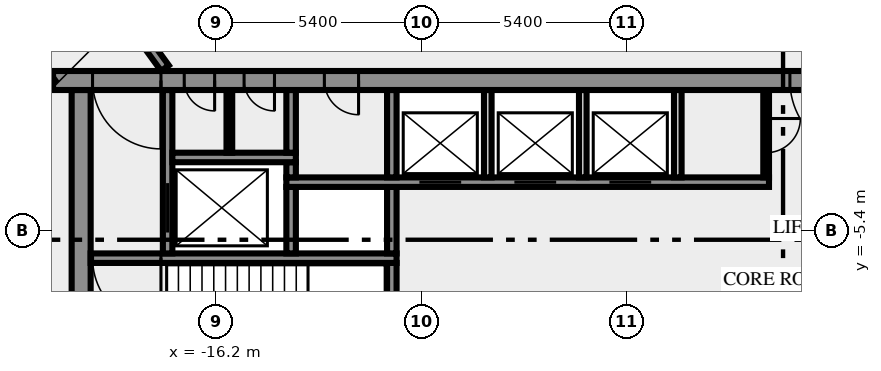
"""IFC4 building model, lengths in metres.
Left out: names, types, materials, properties, quantities, classifications, styles, units other than length and angle.
Written with IfcOpenShell. Run it as: python <this file> out.ifc"""

import sys

from ifc_helpers import new_model, si_unit, direction, frame, frame_2d, origin, place, context, subcontext, project, spatial, rectangle, extrude, element, fill, save


model = new_model("IFC4")
c1 = context("Model", 3, precision=1e-05, world=origin(), true_north=direction((0.0, 1.0)))
c2 = subcontext(c1, "Body", "Model", "MODEL_VIEW")
j1 = project(units=[si_unit("LENGTHUNIT", "METRE"), si_unit("PLANEANGLEUNIT", "RADIAN")], contexts=[c1])
p1 = place(None, origin())
s1 = spatial("IfcSite", under=j1, at=p1, CompositionType="ELEMENT")
p2 = place(p1, origin())
s2 = spatial("IfcBuilding", under=s1, at=p2, CompositionType="ELEMENT")
p3 = place(p2, frame((0.0, 0.0, 101.0)))
s3 = spatial("IfcBuildingStorey", under=s2, at=p3, CompositionType="ELEMENT", Elevation=101.0)
p4 = place(p3, frame((-19.75, -10.5, 0.0), z_axis=(0.0, 0.0, 1.0), x_axis=(0.0, 1.0, 0.0)))
e1 = element("IfcWall", 1, at=p4, inside=s3, PredefinedType="SHEAR", context=c2, shape_type="SweptSolid", body=[
    extrude(rectangle(XDim=8.8, YDim=0.5, at=frame_2d((4.4, 0.0))), origin(), (0.0, 0.0, 1.0), 3.65),
])
p5 = place(p3, frame((-11.575, -7.25, 0.0), z_axis=(0.0, 0.0, 1.0), x_axis=(0.0, 1.0, 0.0)))
e2 = element("IfcWall", 2, at=p5, inside=s3, PredefinedType="SHEAR", context=c2, shape_type="SweptSolid", body=[
    extrude(rectangle(XDim=1.0, YDim=0.25, at=frame_2d((0.5, 0.0))), origin(), (0.0, 0.0, 1.0), 3.65),
])
p6 = place(p3, frame((-11.45, -6.125, 0.0), z_axis=(0.0, 0.0, 1.0), x_axis=(-1.0, 0.0, 0.0)))
e3 = element("IfcWall", 3, at=p6, inside=s3, PredefinedType="SHEAR", context=c2, shape_type="SweptSolid", body=[
    extrude(rectangle(XDim=8.05, YDim=0.25, at=frame_2d((4.025, 0.0))), origin(), (0.0, 0.0, 1.0), 3.65),
])
p7 = place(p6, frame((6.2, 0.0, 0.0)))
e4 = element("IfcOpeningElement", 4, at=p7, cuts=e3, PredefinedType="OPENING", context=c2, shape_type="SweptSolid", body=[
    extrude(rectangle(XDim=1.8, YDim=2.1, at=frame_2d((0.9, 1.05))), frame((0.0, 0.135, 0.0), z_axis=(0.0, -1.0, 0.0), x_axis=(1.0, 0.0, 0.0)), (0.0, 0.0, 1.0), 0.27),
])
p8 = place(p3, frame((-17.475, -6.0, 0.0), z_axis=(0.0, 0.0, 1.0), x_axis=(0.0, 1.0, 0.0)))
e5 = element("IfcWall", 5, at=p8, inside=s3, PredefinedType="SHEAR", context=c2, shape_type="SweptSolid", body=[
    extrude(rectangle(XDim=4.3, YDim=0.25, at=frame_2d((2.15, 0.0))), origin(), (0.0, 0.0, 1.0), 3.65),
])
p9 = place(p8, frame((0.55, 0.0, 0.0)))
e6 = element("IfcOpeningElement", 6, at=p9, cuts=e5, PredefinedType="OPENING", context=c2, shape_type="SweptSolid", body=[
    extrude(rectangle(XDim=1.3, YDim=2.1, at=frame_2d((0.65, 1.05))), frame((0.0, 0.135, 0.0), z_axis=(0.0, -1.0, 0.0), x_axis=(1.0, 0.0, 0.0)), (0.0, 0.0, 1.0), 0.27),
])
for number, where, z_axis, x_axis in (
    (7, (-14.225, -6.0, 0.0), (0.0, 0.0, 1.0), (0.0, 1.0, 0.0)),
    (8, (-11.575, -6.0, 0.0), (0.0, 0.0, 1.0), (0.0, 1.0, 0.0)),
):
    element("IfcWall", number, at=place(p3, frame(where, z_axis=z_axis, x_axis=x_axis)), inside=s3, PredefinedType="SHEAR", context=c2, shape_type="SweptSolid", body=[
        extrude(rectangle(XDim=1.75, YDim=0.25, at=frame_2d((0.875, 0.0))), origin(), (0.0, 0.0, 1.0), 3.65),
    ])
p10 = place(p3, frame((-14.35, -4.125, 0.0), z_axis=(0.0, 0.0, 1.0), x_axis=(1.0, 0.0, 0.0)))
e9 = element("IfcWall", 9, at=p10, inside=s3, PredefinedType="SHEAR", context=c2, shape_type="SweptSolid", body=[
    extrude(rectangle(XDim=12.7, YDim=0.25, at=frame_2d((6.35, 0.0))), origin(), (0.0, 0.0, 1.0), 3.65),
])
p11 = place(p10, frame((3.5, 0.0, 0.0)))
e10 = element("IfcOpeningElement", 10, at=p11, cuts=e9, PredefinedType="OPENING", context=c2, shape_type="SweptSolid", body=[
    extrude(rectangle(XDim=1.1, YDim=2.1, at=frame_2d((0.55, 1.05))), frame((0.0, 0.135, 0.0), z_axis=(0.0, -1.0, 0.0), x_axis=(1.0, 0.0, 0.0)), (0.0, 0.0, 1.0), 0.27),
])
p12 = place(p10, frame((6.0, 0.0, 0.0)))
e11 = element("IfcOpeningElement", 11, at=p12, cuts=e9, PredefinedType="OPENING", context=c2, shape_type="SweptSolid", body=[
    extrude(rectangle(XDim=1.1, YDim=2.1, at=frame_2d((0.55, 1.05))), frame((0.0, 0.135, 0.0), z_axis=(0.0, -1.0, 0.0), x_axis=(1.0, 0.0, 0.0)), (0.0, 0.0, 1.0), 0.27),
])
p13 = place(p10, frame((8.5, 0.0, 0.0)))
e12 = element("IfcOpeningElement", 12, at=p13, cuts=e9, PredefinedType="OPENING", context=c2, shape_type="SweptSolid", body=[
    extrude(rectangle(XDim=1.1, YDim=2.1, at=frame_2d((0.55, 1.05))), frame((0.0, 0.135, 0.0), z_axis=(0.0, -1.0, 0.0), x_axis=(1.0, 0.0, 0.0)), (0.0, 0.0, 1.0), 0.27),
])
p14 = place(p3, frame((-14.225, -4.0, 0.0), z_axis=(0.0, 0.0, 1.0), x_axis=(0.0, 1.0, 0.0)))
e13 = element("IfcWall", 13, at=p14, inside=s3, PredefinedType="SHEAR", context=c2, shape_type="SweptSolid", body=[
    extrude(rectangle(XDim=0.4, YDim=0.25, at=frame_2d((0.2, 0.0))), origin(), (0.0, 0.0, 1.0), 3.65),
])
p15 = place(p3, frame((-11.575, -4.0, 0.0), z_axis=(0.0, 0.0, 1.0), x_axis=(0.0, 1.0, 0.0)))
e14 = element("IfcWall", 14, at=p15, inside=s3, PredefinedType="SHEAR", context=c2, shape_type="SweptSolid", body=[
    extrude(rectangle(XDim=2.3, YDim=0.25, at=frame_2d((1.15, 0.0))), origin(), (0.0, 0.0, 1.0), 3.65),
])
for number, where, z_axis, x_axis in (
    (15, (-9.05, -4.0, 0.0), (0.0, 0.0, 1.0), (0.0, 1.0, 0.0)),
    (16, (-6.55, -4.0, 0.0), (0.0, 0.0, 1.0), (0.0, 1.0, 0.0)),
    (17, (-4.05, -4.0, 0.0), (0.0, 0.0, 1.0), (0.0, 1.0, 0.0)),
):
    element("IfcWall", number, at=place(p3, frame(where, z_axis=z_axis, x_axis=x_axis)), inside=s3, PredefinedType="SOLIDWALL", context=c2, shape_type="SweptSolid", body=[
        extrude(rectangle(XDim=2.3, YDim=0.2, at=frame_2d((1.15, 0.0))), origin(), (0.0, 0.0, 1.0), 3.65),
    ])
p16 = place(p3, frame((-1.725, -1.7, 0.0), z_axis=(0.0, 0.0, 1.0), x_axis=(0.0, -1.0, 0.0)))
e18 = element("IfcWall", 18, at=p16, inside=s3, PredefinedType="PARTITIONING", context=c2, shape_type="SweptSolid", body=[
    extrude(rectangle(XDim=2.3, YDim=0.15, at=frame_2d((1.15, 0.0))), origin(), (0.0, 0.0, 1.0), 3.65),
])
p17 = place(p16, frame((0.75, 0.0, 0.0)))
e19 = element("IfcOpeningElement", 19, at=p17, cuts=e18, PredefinedType="OPENING", context=c2, shape_type="SweptSolid", body=[
    extrude(rectangle(XDim=0.9, YDim=2.1, at=frame_2d((0.45, 1.05))), frame((0.0, 0.085, 0.0), z_axis=(0.0, -1.0, 0.0), x_axis=(1.0, 0.0, 0.0)), (0.0, 0.0, 1.0), 0.17),
])
p18 = place(p3, frame((-17.35, -3.475, 0.0), z_axis=(0.0, 0.0, 1.0), x_axis=(1.0, 0.0, 0.0)))
e20 = element("IfcWall", 20, at=p18, inside=s3, PredefinedType="SHEAR", context=c2, shape_type="SweptSolid", body=[
    extrude(rectangle(XDim=3.25, YDim=0.25, at=frame_2d((1.625, 0.0))), origin(), (0.0, 0.0, 1.0), 3.65),
])
p19 = place(p3, frame((-15.85, -3.35, 0.0), z_axis=(0.0, 0.0, 1.0), x_axis=(0.0, 1.0, 0.0)))
e21 = element("IfcWall", 21, at=p19, inside=s3, PredefinedType="PARTITIONING", context=c2, shape_type="SweptSolid", body=[
    extrude(rectangle(XDim=1.65, YDim=0.15, at=frame_2d((0.825, 0.0))), origin(), (0.0, 0.0, 1.0), 3.65),
])
p20 = place(p3, frame((-14.225, -3.35, 0.0), z_axis=(0.0, 0.0, 1.0), x_axis=(0.0, 1.0, 0.0)))
e22 = element("IfcWall", 22, at=p20, inside=s3, PredefinedType="SHEAR", context=c2, shape_type="SweptSolid", body=[
    extrude(rectangle(XDim=1.65, YDim=0.25, at=frame_2d((0.825, 0.0))), origin(), (0.0, 0.0, 1.0), 3.65),
])
p21 = place(p3, frame((20.49, -1.45, 0.0), z_axis=(0.0, 0.0, 1.0), x_axis=(-1.0, 0.0, 0.0)))
e23 = element("IfcWall", 23, at=p21, inside=s3, PredefinedType="SHEAR", context=c2, shape_type="SweptSolid", body=[
    extrude(rectangle(XDim=40.98, YDim=0.5, at=frame_2d((20.49, 0.0))), origin(), (0.0, 0.0, 1.0), 3.65),
])
p22 = place(p21, frame((38.14, 0.0, 0.0)))
e24 = element("IfcOpeningElement", 24, at=p22, cuts=e23, PredefinedType="OPENING", context=c2, shape_type="SweptSolid", body=[
    extrude(rectangle(XDim=1.8, YDim=2.1, at=frame_2d((0.9, 1.05))), frame((0.0, 0.26, 0.0), z_axis=(0.0, -1.0, 0.0), x_axis=(1.0, 0.0, 0.0)), (0.0, 0.0, 1.0), 0.52),
])
p23 = place(p21, frame((36.728, 0.0, 0.0)))
e25 = element("IfcOpeningElement", 25, at=p23, cuts=e23, PredefinedType="OPENING", context=c2, shape_type="SweptSolid", body=[
    extrude(rectangle(XDim=0.8, YDim=2.1, at=frame_2d((0.4, 1.05))), frame((0.0, 0.26, 0.0), z_axis=(0.0, -1.0, 0.0), x_axis=(1.0, 0.0, 0.0)), (0.0, 0.0, 1.0), 0.52),
])
p24 = place(p21, frame((35.153, 0.0, 0.0)))
e26 = element("IfcOpeningElement", 26, at=p24, cuts=e23, PredefinedType="OPENING", context=c2, shape_type="SweptSolid", body=[
    extrude(rectangle(XDim=0.8, YDim=2.1, at=frame_2d((0.4, 1.05))), frame((0.0, 0.26, 0.0), z_axis=(0.0, -1.0, 0.0), x_axis=(1.0, 0.0, 0.0)), (0.0, 0.0, 1.0), 0.52),
])
p25 = place(p21, frame((32.94, 0.0, 0.0)))
e27 = element("IfcOpeningElement", 27, at=p25, cuts=e23, PredefinedType="OPENING", context=c2, shape_type="SweptSolid", body=[
    extrude(rectangle(XDim=0.9, YDim=2.1, at=frame_2d((0.45, 1.05))), frame((0.0, 0.26, 0.0), z_axis=(0.0, -1.0, 0.0), x_axis=(1.0, 0.0, 0.0)), (0.0, 0.0, 1.0), 0.52),
])
p26 = place(p21, frame((19.59, 0.0, 0.0)))
e28 = element("IfcOpeningElement", 28, at=p26, cuts=e23, PredefinedType="OPENING", context=c2, shape_type="SweptSolid", body=[
    extrude(rectangle(XDim=2.0, YDim=2.1, at=frame_2d((1.0, 1.05))), frame((0.0, 0.26, 0.0), z_axis=(0.0, -1.0, 0.0), x_axis=(1.0, 0.0, 0.0)), (0.0, 0.0, 1.0), 0.52),
])
p27 = place(p21, frame((7.14, 0.0, 0.0)))
e29 = element("IfcOpeningElement", 29, at=p27, cuts=e23, PredefinedType="OPENING", context=c2, shape_type="SweptSolid", body=[
    extrude(rectangle(XDim=0.9, YDim=2.1, at=frame_2d((0.45, 1.05))), frame((0.0, 0.26, 0.0), z_axis=(0.0, -1.0, 0.0), x_axis=(1.0, 0.0, 0.0)), (0.0, 0.0, 1.0), 0.52),
])
p28 = place(p21, frame((4.19, 0.0, 0.0)))
e30 = element("IfcOpeningElement", 30, at=p28, cuts=e23, PredefinedType="OPENING", context=c2, shape_type="SweptSolid", body=[
    extrude(rectangle(XDim=0.9, YDim=2.1, at=frame_2d((0.45, 1.05))), frame((0.0, 0.26, 0.0), z_axis=(0.0, -1.0, 0.0), x_axis=(1.0, 0.0, 0.0)), (0.0, 0.0, 1.0), 0.52),
])
p29 = place(p21, frame((1.04, 0.0, 0.0)))
e31 = element("IfcOpeningElement", 31, at=p29, cuts=e23, PredefinedType="OPENING", context=c2, shape_type="SweptSolid", body=[
    extrude(rectangle(XDim=1.8, YDim=2.1, at=frame_2d((0.9, 1.05))), frame((0.0, 0.26, 0.0), z_axis=(0.0, -1.0, 0.0), x_axis=(1.0, 0.0, 0.0)), (0.0, 0.0, 1.0), 0.52),
])
p30 = place(p3, frame((-20.531, -1.523, 0.0), z_axis=(0.0, 0.0, 1.0), x_axis=(-0.587784593204, 0.809017473231, 0.0)))
e32 = element("IfcWall", 32, at=p30, inside=s3, PredefinedType="SOLIDWALL", context=c2, shape_type="SweptSolid", body=[
    extrude(rectangle(XDim=44.67, YDim=0.25, at=frame_2d((22.335, 0.0))), origin(), (0.0, 0.0, 1.0), 3.65),
])
p31 = place(p30, frame((43.296, 0.0, 0.0)))
e33 = element("IfcOpeningElement", 33, at=p31, cuts=e32, PredefinedType="OPENING", context=c2, shape_type="SweptSolid", body=[
    extrude(rectangle(XDim=0.9, YDim=2.1, at=frame_2d((0.45, 1.05))), frame((0.0, 0.135, 0.0), z_axis=(0.0, -1.0, 0.0), x_axis=(1.0, 0.0, 0.0)), (0.0, 0.0, 1.0), 0.27),
])
p32 = place(p30, frame((15.916, 0.0, 0.0)))
e34 = element("IfcOpeningElement", 34, at=p32, cuts=e32, PredefinedType="OPENING", context=c2, shape_type="SweptSolid", body=[
    extrude(rectangle(XDim=0.9, YDim=2.1, at=frame_2d((0.45, 1.05))), frame((0.0, 0.135, 0.0), z_axis=(0.0, -1.0, 0.0), x_axis=(1.0, 0.0, 0.0)), (0.0, 0.0, 1.0), 0.27),
])
p33 = place(p30, frame((33.116, 0.0, 0.0)))
e35 = element("IfcOpeningElement", 35, at=p33, cuts=e32, PredefinedType="OPENING", context=c2, shape_type="SweptSolid", body=[
    extrude(rectangle(XDim=1.0, YDim=2.1, at=frame_2d((0.5, 1.05))), frame((0.0, 0.135, 0.0), z_axis=(0.0, -1.0, 0.0), x_axis=(1.0, 0.0, 0.0)), (0.0, 0.0, 1.0), 0.27),
])
p34 = place(p30, frame((14.216, 0.0, 0.0)))
e36 = element("IfcOpeningElement", 36, at=p34, cuts=e32, PredefinedType="OPENING", context=c2, shape_type="SweptSolid", body=[
    extrude(rectangle(XDim=1.0, YDim=2.1, at=frame_2d((0.5, 1.05))), frame((0.0, 0.135, 0.0), z_axis=(0.0, -1.0, 0.0), x_axis=(1.0, 0.0, 0.0)), (0.0, 0.0, 1.0), 0.27),
])
p35 = place(p3, frame((-37.232, 25.972, 0.0), z_axis=(0.0, 0.0, 1.0), x_axis=(0.587786323093, -0.809016216391, 0.0)))
e37 = element("IfcWall", 37, at=p35, inside=s3, PredefinedType="SOLIDWALL", context=c2, shape_type="SweptSolid", body=[
    extrude(rectangle(XDim=33.493, YDim=0.25, at=frame_2d((16.747, 0.0))), origin(), (0.0, 0.0, 1.0), 3.65),
])
p36 = place(p35, frame((13.185, 0.0, 0.0)))
e38 = element("IfcOpeningElement", 38, at=p36, cuts=e37, PredefinedType="OPENING", context=c2, shape_type="SweptSolid", body=[
    extrude(rectangle(XDim=1.2, YDim=2.1, at=frame_2d((0.6, 1.05))), frame((0.0, 0.135, 0.0), z_axis=(0.0, -1.0, 0.0), x_axis=(1.0, 0.0, 0.0)), (0.0, 0.0, 1.0), 0.27),
])
p37 = place(p35, frame((29.152, 0.0, 0.0)))
e39 = element("IfcOpeningElement", 39, at=p37, cuts=e37, PredefinedType="OPENING", context=c2, shape_type="SweptSolid", body=[
    extrude(rectangle(XDim=0.9, YDim=2.1, at=frame_2d((0.45, 1.05))), frame((0.0, 0.135, 0.0), z_axis=(0.0, -1.0, 0.0), x_axis=(1.0, 0.0, 0.0)), (0.0, 0.0, 1.0), 0.27),
])
p38 = place(p7, origin())
e40 = element("IfcDoor", 40, at=p38, inside=s3, OperationType="DOUBLE_DOOR_SINGLE_SWING", PredefinedType="DOOR", context=c2, shape_type="SweptSolid", body=[
    extrude(rectangle(XDim=1.8, YDim=2.1, at=frame_2d((0.9, 1.05))), frame((0.0, 0.025, 0.0), z_axis=(0.0, -1.0, 0.0), x_axis=(1.0, 0.0, 0.0)), (0.0, 0.0, 1.0), 0.05),
])
fill(e4, e40)
p39 = place(p9, origin())
e41 = element("IfcDoor", 41, at=p39, inside=s3, OperationType="DOUBLE_DOOR_SLIDING", PredefinedType="DOOR", context=c2, shape_type="SweptSolid", body=[
    extrude(rectangle(XDim=1.3, YDim=2.1, at=frame_2d((0.65, 1.05))), frame((0.0, 0.025, 0.0), z_axis=(0.0, -1.0, 0.0), x_axis=(1.0, 0.0, 0.0)), (0.0, 0.0, 1.0), 0.05),
])
fill(e6, e41)
p40 = place(p11, origin())
e42 = element("IfcDoor", 42, at=p40, inside=s3, OperationType="DOUBLE_DOOR_SLIDING", PredefinedType="DOOR", context=c2, shape_type="SweptSolid", body=[
    extrude(rectangle(XDim=1.1, YDim=2.1, at=frame_2d((0.55, 1.05))), frame((0.0, 0.025, 0.0), z_axis=(0.0, -1.0, 0.0), x_axis=(1.0, 0.0, 0.0)), (0.0, 0.0, 1.0), 0.05),
])
fill(e10, e42)
p41 = place(p12, origin())
e43 = element("IfcDoor", 43, at=p41, inside=s3, OperationType="DOUBLE_DOOR_SLIDING", PredefinedType="DOOR", context=c2, shape_type="SweptSolid", body=[
    extrude(rectangle(XDim=1.1, YDim=2.1, at=frame_2d((0.55, 1.05))), frame((0.0, 0.025, 0.0), z_axis=(0.0, -1.0, 0.0), x_axis=(1.0, 0.0, 0.0)), (0.0, 0.0, 1.0), 0.05),
])
fill(e11, e43)
p42 = place(p13, origin())
e44 = element("IfcDoor", 44, at=p42, inside=s3, OperationType="DOUBLE_DOOR_SLIDING", PredefinedType="DOOR", context=c2, shape_type="SweptSolid", body=[
    extrude(rectangle(XDim=1.1, YDim=2.1, at=frame_2d((0.55, 1.05))), frame((0.0, 0.025, 0.0), z_axis=(0.0, -1.0, 0.0), x_axis=(1.0, 0.0, 0.0)), (0.0, 0.0, 1.0), 0.05),
])
fill(e12, e44)
p43 = place(p17, origin())
e45 = element("IfcDoor", 45, at=p43, inside=s3, OperationType="SINGLE_SWING_RIGHT", PredefinedType="DOOR", context=c2, shape_type="SweptSolid", body=[
    extrude(rectangle(XDim=0.9, YDim=2.1, at=frame_2d((0.45, 1.05))), frame((0.0, 0.025, 0.0), z_axis=(0.0, -1.0, 0.0), x_axis=(1.0, 0.0, 0.0)), (0.0, 0.0, 1.0), 0.05),
])
fill(e19, e45)
p44 = place(p22, origin())
e46 = element("IfcDoor", 46, at=p44, inside=s3, OperationType="DOUBLE_DOOR_SINGLE_SWING", PredefinedType="DOOR", context=c2, shape_type="SweptSolid", body=[
    extrude(rectangle(XDim=1.8, YDim=2.1, at=frame_2d((0.9, 1.05))), frame((0.0, 0.025, 0.0), z_axis=(0.0, -1.0, 0.0), x_axis=(1.0, 0.0, 0.0)), (0.0, 0.0, 1.0), 0.05),
])
fill(e24, e46)
p45 = place(p23, origin())
e47 = element("IfcDoor", 47, at=p45, inside=s3, OperationType="SINGLE_SWING_RIGHT", PredefinedType="DOOR", context=c2, shape_type="SweptSolid", body=[
    extrude(rectangle(XDim=0.8, YDim=2.1, at=frame_2d((0.4, 1.05))), frame((0.0, 0.025, 0.0), z_axis=(0.0, -1.0, 0.0), x_axis=(1.0, 0.0, 0.0)), (0.0, 0.0, 1.0), 0.05),
])
fill(e25, e47)
p46 = place(p24, origin())
e48 = element("IfcDoor", 48, at=p46, inside=s3, OperationType="SINGLE_SWING_RIGHT", PredefinedType="DOOR", context=c2, shape_type="SweptSolid", body=[
    extrude(rectangle(XDim=0.8, YDim=2.1, at=frame_2d((0.4, 1.05))), frame((0.0, 0.025, 0.0), z_axis=(0.0, -1.0, 0.0), x_axis=(1.0, 0.0, 0.0)), (0.0, 0.0, 1.0), 0.05),
])
fill(e26, e48)
p47 = place(p25, origin())
e49 = element("IfcDoor", 49, at=p47, inside=s3, OperationType="SINGLE_SWING_RIGHT", PredefinedType="DOOR", context=c2, shape_type="SweptSolid", body=[
    extrude(rectangle(XDim=0.9, YDim=2.1, at=frame_2d((0.45, 1.05))), frame((0.0, 0.025, 0.0), z_axis=(0.0, -1.0, 0.0), x_axis=(1.0, 0.0, 0.0)), (0.0, 0.0, 1.0), 0.05),
])
fill(e27, e49)
p48 = place(p26, origin())
e50 = element("IfcDoor", 50, at=p48, inside=s3, OperationType="DOUBLE_DOOR_SINGLE_SWING", PredefinedType="DOOR", context=c2, shape_type="SweptSolid", body=[
    extrude(rectangle(XDim=2.0, YDim=2.1, at=frame_2d((1.0, 1.05))), frame((0.0, 0.025, 0.0), z_axis=(0.0, -1.0, 0.0), x_axis=(1.0, 0.0, 0.0)), (0.0, 0.0, 1.0), 0.05),
])
fill(e28, e50)
save(model, sys.argv[1])
